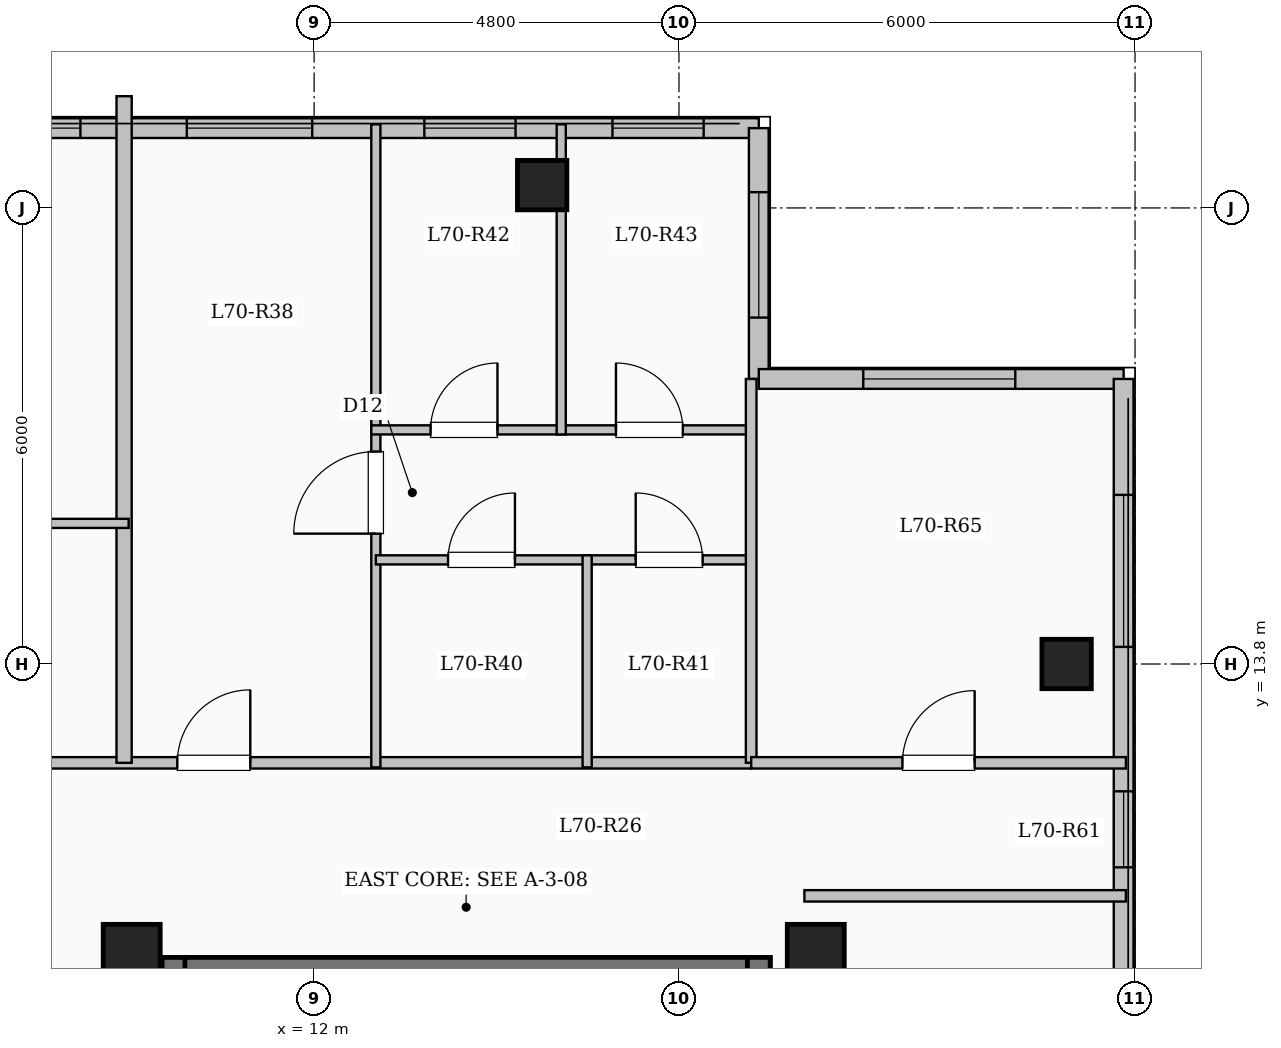
"""IFC4 building model, lengths in metres.
Left out: names, types, materials, properties, quantities, classifications, styles, units other than length and angle.
Written with IfcOpenShell. Run it as: python <this file> out.ifc"""

import sys

from ifc_helpers import new_model, si_unit, direction, frame, frame_2d, origin, origin_2d, place, context, subcontext, project, spatial, rectangle, extrude, element, fill, save


model = new_model("IFC4")
c1 = context("Model", 3, precision=1e-05, world=origin(), true_north=direction((0.0, 1.0)))
c2 = subcontext(c1, "Body", "Model", "MODEL_VIEW")
j1 = project(units=[si_unit("LENGTHUNIT", "METRE"), si_unit("PLANEANGLEUNIT", "RADIAN")], contexts=[c1])
p1 = place(None, origin())
s1 = spatial("IfcSite", under=j1, at=p1, CompositionType="ELEMENT")
p2 = place(p1, origin())
s2 = spatial("IfcBuilding", under=s1, at=p2, CompositionType="ELEMENT")
p3 = place(p2, frame((0.0, 0.0, 258.25)))
s3 = spatial("IfcBuildingStorey", under=s2, at=p3, CompositionType="ELEMENT", Elevation=258.25)
for number, where, z_axis, x_axis in (
    (1, (9.6, 10.0, 0.0), (0.0, 0.0, 1.0), (1.0, 0.0, 0.0)),
    (2, (18.6, 10.0, 0.0), (0.0, 0.0, 1.0), (1.0, 0.0, 0.0)),
):
    element("IfcColumn", number, at=place(p3, frame(where, z_axis=z_axis, x_axis=x_axis)), inside=s3, PredefinedType="COLUMN", context=c2, shape_type="SweptSolid", body=[
        extrude(rectangle(XDim=0.75, YDim=0.75, at=origin_2d()), origin(), (0.0, 0.0, 1.0), 3.35),
    ])
for number, where, z_axis, x_axis in (
    (3, (15.0, 20.1, 0.0), (0.0, 0.0, 1.0), (1.0, 0.0, 0.0)),
    (4, (21.9, 13.8, 0.0), (0.0, 0.0, 1.0), (1.0, 0.0, 0.0)),
):
    element("IfcColumn", number, at=place(p3, frame(where, z_axis=z_axis, x_axis=x_axis)), inside=s3, PredefinedType="COLUMN", context=c2, shape_type="SweptSolid", body=[
        extrude(rectangle(XDim=0.65, YDim=0.65, at=origin_2d()), origin(), (0.0, 0.0, 1.0), 3.35),
    ])
p4 = place(p3, frame((7.35, 20.85, 0.0), z_axis=(0.0, 0.0, 1.0), x_axis=(1.0, 0.0, 0.0)))
e5 = element("IfcWall", 5, at=p4, inside=s3, PredefinedType="SOLIDWALL", context=c2, shape_type="SweptSolid", body=[
    extrude(rectangle(XDim=10.5, YDim=0.26, at=frame_2d((5.25, 0.0))), origin(), (0.0, 0.0, 1.0), 3.1),
])
p5 = place(p4, frame((0.375, 0.0, 0.95)))
e6 = element("IfcOpeningElement", 6, at=p5, cuts=e5, PredefinedType="OPENING", context=c2, shape_type="SweptSolid", body=[
    extrude(rectangle(XDim=1.2, YDim=1.5, at=frame_2d((0.6, 0.75))), frame((0.0, 0.14, 0.0), z_axis=(0.0, -1.0, 0.0), x_axis=(1.0, 0.0, 0.0)), (0.0, 0.0, 1.0), 0.28),
])
p6 = place(p4, frame((2.975, 0.0, 0.9)))
e7 = element("IfcOpeningElement", 7, at=p6, cuts=e5, PredefinedType="OPENING", context=c2, shape_type="SweptSolid", body=[
    extrude(rectangle(XDim=1.65, YDim=1.6, at=frame_2d((0.825, 0.8))), frame((0.0, 0.14, 0.0), z_axis=(0.0, -1.0, 0.0), x_axis=(1.0, 0.0, 0.0)), (0.0, 0.0, 1.0), 0.28),
])
p7 = place(p4, frame((6.1, 0.0, 0.95)))
e8 = element("IfcOpeningElement", 8, at=p7, cuts=e5, PredefinedType="OPENING", context=c2, shape_type="SweptSolid", body=[
    extrude(rectangle(XDim=1.2, YDim=1.5, at=frame_2d((0.6, 0.75))), frame((0.0, 0.14, 0.0), z_axis=(0.0, -1.0, 0.0), x_axis=(1.0, 0.0, 0.0)), (0.0, 0.0, 1.0), 0.28),
])
p8 = place(p4, frame((8.575, 0.0, 0.95)))
e9 = element("IfcOpeningElement", 9, at=p8, cuts=e5, PredefinedType="OPENING", context=c2, shape_type="SweptSolid", body=[
    extrude(rectangle(XDim=1.2, YDim=1.5, at=frame_2d((0.6, 0.75))), frame((0.0, 0.14, 0.0), z_axis=(0.0, -1.0, 0.0), x_axis=(1.0, 0.0, 0.0)), (0.0, 0.0, 1.0), 0.28),
])
p9 = place(p3, frame((17.85, 20.85, 0.0), z_axis=(0.0, 0.0, 1.0), x_axis=(0.0, -1.0, 0.0)))
e10 = element("IfcWall", 10, at=p9, inside=s3, PredefinedType="SOLIDWALL", context=c2, shape_type="SweptSolid", body=[
    extrude(rectangle(XDim=3.3, YDim=0.26, at=frame_2d((1.65, 0.0))), origin(), (0.0, 0.0, 1.0), 3.1),
])
p10 = place(p9, frame((0.843, 0.0, 0.9)))
e11 = element("IfcOpeningElement", 11, at=p10, cuts=e10, PredefinedType="OPENING", context=c2, shape_type="SweptSolid", body=[
    extrude(rectangle(XDim=1.65, YDim=1.6, at=frame_2d((0.825, 0.8))), frame((0.0, 0.14, 0.0), z_axis=(0.0, -1.0, 0.0), x_axis=(1.0, 0.0, 0.0)), (0.0, 0.0, 1.0), 0.28),
])
p11 = place(p3, frame((17.85, 17.55, 0.0), z_axis=(0.0, 0.0, 1.0), x_axis=(1.0, 0.0, 0.0)))
e12 = element("IfcWall", 12, at=p11, inside=s3, PredefinedType="SOLIDWALL", context=c2, shape_type="SweptSolid", body=[
    extrude(rectangle(XDim=4.8, YDim=0.26, at=frame_2d((2.4, 0.0))), origin(), (0.0, 0.0, 1.0), 3.1),
])
p12 = place(p11, frame((1.375, 0.0, 0.9)))
e13 = element("IfcOpeningElement", 13, at=p12, cuts=e12, PredefinedType="OPENING", context=c2, shape_type="SweptSolid", body=[
    extrude(rectangle(XDim=2.0, YDim=1.7, at=frame_2d((1.0, 0.85))), frame((0.0, 0.14, 0.0), z_axis=(0.0, -1.0, 0.0), x_axis=(1.0, 0.0, 0.0)), (0.0, 0.0, 1.0), 0.28),
])
p13 = place(p3, frame((22.65, 17.55, 0.0), z_axis=(0.0, 0.0, 1.0), x_axis=(0.0, -1.0, 0.0)))
e14 = element("IfcWall", 14, at=p13, inside=s3, PredefinedType="SOLIDWALL", context=c2, shape_type="SweptSolid", body=[
    extrude(rectangle(XDim=35.1, YDim=0.26, at=frame_2d((17.55, 0.0))), origin(), (0.0, 0.0, 1.0), 3.1),
])
p14 = place(p13, frame((1.525, 0.0, 0.9)))
e15 = element("IfcOpeningElement", 15, at=p14, cuts=e14, PredefinedType="OPENING", context=c2, shape_type="SweptSolid", body=[
    extrude(rectangle(XDim=2.0, YDim=1.7, at=frame_2d((1.0, 0.85))), frame((0.0, 0.14, 0.0), z_axis=(0.0, -1.0, 0.0), x_axis=(1.0, 0.0, 0.0)), (0.0, 0.0, 1.0), 0.28),
])
p15 = place(p13, frame((5.425, 0.0, 0.95)))
e16 = element("IfcOpeningElement", 16, at=p15, cuts=e14, PredefinedType="OPENING", context=c2, shape_type="SweptSolid", body=[
    extrude(rectangle(XDim=1.0, YDim=1.5, at=frame_2d((0.5, 0.75))), frame((0.0, 0.14, 0.0), z_axis=(0.0, -1.0, 0.0), x_axis=(1.0, 0.0, 0.0)), (0.0, 0.0, 1.0), 0.28),
])
p16 = place(p13, frame((14.8, 0.0, 0.9)))
e17 = element("IfcOpeningElement", 17, at=p16, cuts=e14, PredefinedType="OPENING", context=c2, shape_type="SweptSolid", body=[
    extrude(rectangle(XDim=2.0, YDim=1.7, at=frame_2d((1.0, 0.85))), frame((0.0, 0.14, 0.0), z_axis=(0.0, -1.0, 0.0), x_axis=(1.0, 0.0, 0.0)), (0.0, 0.0, 1.0), 0.28),
])
p17 = place(p13, frame((25.275, 0.0, 0.95)))
e18 = element("IfcOpeningElement", 18, at=p17, cuts=e14, PredefinedType="OPENING", context=c2, shape_type="SweptSolid", body=[
    extrude(rectangle(XDim=1.2, YDim=1.5, at=frame_2d((0.6, 0.75))), frame((0.0, 0.14, 0.0), z_axis=(0.0, -1.0, 0.0), x_axis=(1.0, 0.0, 0.0)), (0.0, 0.0, 1.0), 0.28),
])
p18 = place(p13, frame((29.925, 0.0, 0.9)))
e19 = element("IfcOpeningElement", 19, at=p18, cuts=e14, PredefinedType="OPENING", context=c2, shape_type="SweptSolid", body=[
    extrude(rectangle(XDim=2.2, YDim=1.75, at=frame_2d((1.1, 0.875))), frame((0.0, 0.14, 0.0), z_axis=(0.0, -1.0, 0.0), x_axis=(1.0, 0.0, 0.0)), (0.0, 0.0, 1.0), 0.28),
])
p19 = place(p3, frame((10.0, 9.79, 0.0), z_axis=(0.0, 0.0, 1.0), x_axis=(1.0, 0.0, 0.0)))
e20 = element("IfcWall", 20, at=p19, inside=s3, PredefinedType="SHEAR", context=c2, shape_type="SweptSolid", body=[
    extrude(rectangle(XDim=8.0, YDim=0.3, at=frame_2d((4.0, 0.0))), origin(), (0.0, 0.0, 1.0), 3.35),
])
for number, where, z_axis, x_axis in (
    (21, (10.15, 6.35, 0.0), (0.0, 0.0, 1.0), (0.0, 1.0, 0.0)),
    (22, (17.85, 6.35, 0.0), (0.0, 0.0, 1.0), (0.0, 1.0, 0.0)),
):
    element("IfcWall", number, at=place(p3, frame(where, z_axis=z_axis, x_axis=x_axis)), inside=s3, PredefinedType="SHEAR", context=c2, shape_type="SweptSolid", body=[
        extrude(rectangle(XDim=3.59, YDim=0.3, at=frame_2d((1.795, 0.0))), origin(), (0.0, 0.0, 1.0), 3.35),
    ])
p20 = place(p3, frame((3.85, 12.5, 0.0), z_axis=(0.0, 0.0, 1.0), x_axis=(1.0, 0.0, 0.0)))
e23 = element("IfcWall", 23, at=p20, inside=s3, PredefinedType="PARTITIONING", context=c2, shape_type="SweptSolid", body=[
    extrude(rectangle(XDim=13.9, YDim=0.15, at=frame_2d((6.95, 0.0))), origin(), (0.0, 0.0, 1.0), 3.1),
])
p21 = place(p20, frame((1.45, 0.0, 0.0)))
e24 = element("IfcOpeningElement", 24, at=p21, cuts=e23, PredefinedType="OPENING", context=c2, shape_type="SweptSolid", body=[
    extrude(rectangle(XDim=0.96, YDim=2.15, at=frame_2d((0.48, 1.075))), frame((0.0, 0.085, 0.0), z_axis=(0.0, -1.0, 0.0), x_axis=(1.0, 0.0, 0.0)), (0.0, 0.0, 1.0), 0.17),
])
p22 = place(p20, frame((6.35, 0.0, 0.0)))
e25 = element("IfcOpeningElement", 25, at=p22, cuts=e23, PredefinedType="OPENING", context=c2, shape_type="SweptSolid", body=[
    extrude(rectangle(XDim=0.96, YDim=2.15, at=frame_2d((0.48, 1.075))), frame((0.0, 0.085, 0.0), z_axis=(0.0, -1.0, 0.0), x_axis=(1.0, 0.0, 0.0)), (0.0, 0.0, 1.0), 0.17),
])
p23 = place(p3, frame((9.5, 12.5, 0.0), z_axis=(0.0, 0.0, 1.0), x_axis=(0.0, 1.0, 0.0)))
e26 = element("IfcWall", 26, at=p23, inside=s3, PredefinedType="SOLIDWALL", context=c2, shape_type="SweptSolid", body=[
    extrude(rectangle(XDim=8.77, YDim=0.2, at=frame_2d((4.385, 0.0))), origin(), (0.0, 0.0, 1.0), 3.1),
])
p24 = place(p3, frame((4.965, 15.65, 0.0), z_axis=(0.0, 0.0, 1.0), x_axis=(1.0, 0.0, 0.0)))
e27 = element("IfcWall", 27, at=p24, inside=s3, PredefinedType="PARTITIONING", context=c2, shape_type="SweptSolid", body=[
    extrude(rectangle(XDim=4.595, YDim=0.12, at=frame_2d((2.297, 0.0))), origin(), (0.0, 0.0, 1.0), 2.785),
])
p25 = place(p3, frame((12.812, 12.44, 0.0), z_axis=(0.0, 0.0, 1.0), x_axis=(0.0, 1.0, 0.0)))
e28 = element("IfcWall", 28, at=p25, inside=s3, PredefinedType="PARTITIONING", context=c2, shape_type="SweptSolid", body=[
    extrude(rectangle(XDim=8.46, YDim=0.12, at=frame_2d((4.23, 0.0))), origin(), (0.0, 0.0, 1.0), 3.1),
])
p26 = place(p25, frame((3.075, 0.0, 0.0)))
e29 = element("IfcOpeningElement", 29, at=p26, cuts=e28, PredefinedType="OPENING", context=c2, shape_type="SweptSolid", body=[
    extrude(rectangle(XDim=1.08, YDim=2.15, at=frame_2d((0.54, 1.075))), frame((0.0, 0.07, 0.0), z_axis=(0.0, -1.0, 0.0), x_axis=(1.0, 0.0, 0.0)), (0.0, 0.0, 1.0), 0.14),
])
p27 = place(p3, frame((12.812, 15.17, 0.0), z_axis=(0.0, 0.0, 1.0), x_axis=(1.0, 0.0, 0.0)))
e30 = element("IfcWall", 30, at=p27, inside=s3, PredefinedType="PARTITIONING", context=c2, shape_type="SweptSolid", body=[
    extrude(rectangle(XDim=2.78, YDim=0.12, at=frame_2d((1.39, 0.0))), origin(), (0.0, 0.0, 1.0), 3.1),
])
p28 = place(p27, frame((0.95, 0.0, 0.0)))
e31 = element("IfcOpeningElement", 31, at=p28, cuts=e30, PredefinedType="OPENING", context=c2, shape_type="SweptSolid", body=[
    extrude(rectangle(XDim=0.88, YDim=2.1, at=frame_2d((0.44, 1.05))), frame((0.0, 0.07, 0.0), z_axis=(0.0, -1.0, 0.0), x_axis=(1.0, 0.0, 0.0)), (0.0, 0.0, 1.0), 0.14),
])
p29 = place(p3, frame((15.592, 15.17, 0.0), z_axis=(0.0, 0.0, 1.0), x_axis=(1.0, 0.0, 0.0)))
e32 = element("IfcWall", 32, at=p29, inside=s3, PredefinedType="PARTITIONING", context=c2, shape_type="SweptSolid", body=[
    extrude(rectangle(XDim=2.158, YDim=0.12, at=frame_2d((1.079, 0.0))), origin(), (0.0, 0.0, 1.0), 3.1),
])
p30 = place(p29, frame((0.639, 0.0, 0.0)))
e33 = element("IfcOpeningElement", 33, at=p30, cuts=e32, PredefinedType="OPENING", context=c2, shape_type="SweptSolid", body=[
    extrude(rectangle(XDim=0.88, YDim=2.1, at=frame_2d((0.44, 1.05))), frame((0.0, 0.07, 0.0), z_axis=(0.0, -1.0, 0.0), x_axis=(1.0, 0.0, 0.0)), (0.0, 0.0, 1.0), 0.14),
])
p31 = place(p3, frame((12.752, 16.88, 0.0), z_axis=(0.0, 0.0, 1.0), x_axis=(1.0, 0.0, 0.0)))
e34 = element("IfcWall", 34, at=p31, inside=s3, PredefinedType="PARTITIONING", context=c2, shape_type="SweptSolid", body=[
    extrude(rectangle(XDim=5.058, YDim=0.12, at=frame_2d((2.529, 0.0))), origin(), (0.0, 0.0, 1.0), 2.785),
])
p32 = place(p31, frame((0.78, 0.0, 0.0)))
e35 = element("IfcOpeningElement", 35, at=p32, cuts=e34, PredefinedType="OPENING", context=c2, shape_type="SweptSolid", body=[
    extrude(rectangle(XDim=0.88, YDim=2.1, at=frame_2d((0.44, 1.05))), frame((0.0, 0.07, 0.0), z_axis=(0.0, -1.0, 0.0), x_axis=(1.0, 0.0, 0.0)), (0.0, 0.0, 1.0), 0.14),
])
p33 = place(p31, frame((3.219, 0.0, 0.0)))
e36 = element("IfcOpeningElement", 36, at=p33, cuts=e34, PredefinedType="OPENING", context=c2, shape_type="SweptSolid", body=[
    extrude(rectangle(XDim=0.88, YDim=2.1, at=frame_2d((0.44, 1.05))), frame((0.0, 0.07, 0.0), z_axis=(0.0, -1.0, 0.0), x_axis=(1.0, 0.0, 0.0)), (0.0, 0.0, 1.0), 0.14),
])
p34 = place(p3, frame((15.592, 12.44, 0.0), z_axis=(0.0, 0.0, 1.0), x_axis=(0.0, 1.0, 0.0)))
e37 = element("IfcWall", 37, at=p34, inside=s3, PredefinedType="PARTITIONING", context=c2, shape_type="SweptSolid", body=[
    extrude(rectangle(XDim=2.79, YDim=0.12, at=frame_2d((1.395, 0.0))), origin(), (0.0, 0.0, 1.0), 3.1),
])
p35 = place(p3, frame((15.251, 16.82, 0.0), z_axis=(0.0, 0.0, 1.0), x_axis=(0.0, 1.0, 0.0)))
e38 = element("IfcWall", 38, at=p35, inside=s3, PredefinedType="PARTITIONING", context=c2, shape_type="SweptSolid", body=[
    extrude(rectangle(XDim=4.08, YDim=0.12, at=frame_2d((2.04, 0.0))), origin(), (0.0, 0.0, 1.0), 2.685),
])
p36 = place(p3, frame((18.45, 10.75, 0.0), z_axis=(0.0, 0.0, 1.0), x_axis=(1.0, 0.0, 0.0)))
e39 = element("IfcWall", 39, at=p36, inside=s3, PredefinedType="PARTITIONING", context=c2, shape_type="SweptSolid", body=[
    extrude(rectangle(XDim=4.23, YDim=0.15, at=frame_2d((2.115, 0.0))), origin(), (0.0, 0.0, 1.0), 3.1),
])
p37 = place(p3, frame((17.75, 12.5, 0.0), z_axis=(0.0, 0.0, 1.0), x_axis=(0.0, 1.0, 0.0)))
e40 = element("IfcWall", 40, at=p37, inside=s3, PredefinedType="PARTITIONING", context=c2, shape_type="SweptSolid", body=[
    extrude(rectangle(XDim=5.05, YDim=0.14, at=frame_2d((2.525, 0.0))), origin(), (0.0, 0.0, 1.0), 3.1),
])
p38 = place(p3, frame((17.75, 12.5, 0.0), z_axis=(0.0, 0.0, 1.0), x_axis=(1.0, 0.0, 0.0)))
e41 = element("IfcWall", 41, at=p38, inside=s3, PredefinedType="PARTITIONING", context=c2, shape_type="SweptSolid", body=[
    extrude(rectangle(XDim=4.93, YDim=0.15, at=frame_2d((2.465, 0.0))), origin(), (0.0, 0.0, 1.0), 3.1),
])
p39 = place(p38, frame((1.99, 0.0, 0.0)))
e42 = element("IfcOpeningElement", 42, at=p39, cuts=e41, PredefinedType="OPENING", context=c2, shape_type="SweptSolid", body=[
    extrude(rectangle(XDim=0.95, YDim=2.15, at=frame_2d((0.475, 1.075))), frame((0.0, 0.085, 0.0), z_axis=(0.0, -1.0, 0.0), x_axis=(1.0, 0.0, 0.0)), (0.0, 0.0, 1.0), 0.17),
])
p40 = place(p5, origin())
e43 = element("IfcWindow", 43, at=p40, inside=s3, PartitioningType="SINGLE_PANEL", PredefinedType="WINDOW", context=c2, shape_type="SweptSolid", body=[
    extrude(rectangle(XDim=1.2, YDim=1.5, at=frame_2d((0.6, 0.75))), frame((0.0, 0.03, 0.0), z_axis=(0.0, -1.0, 0.0), x_axis=(1.0, 0.0, 0.0)), (0.0, 0.0, 1.0), 0.06),
])
fill(e6, e43)
p41 = place(p6, origin())
e44 = element("IfcWindow", 44, at=p41, inside=s3, PartitioningType="SINGLE_PANEL", PredefinedType="WINDOW", context=c2, shape_type="SweptSolid", body=[
    extrude(rectangle(XDim=1.65, YDim=1.6, at=frame_2d((0.825, 0.8))), frame((0.0, 0.03, 0.0), z_axis=(0.0, -1.0, 0.0), x_axis=(1.0, 0.0, 0.0)), (0.0, 0.0, 1.0), 0.06),
])
fill(e7, e44)
p42 = place(p7, origin())
e45 = element("IfcWindow", 45, at=p42, inside=s3, PartitioningType="SINGLE_PANEL", PredefinedType="WINDOW", context=c2, shape_type="SweptSolid", body=[
    extrude(rectangle(XDim=1.2, YDim=1.5, at=frame_2d((0.6, 0.75))), frame((0.0, 0.03, 0.0), z_axis=(0.0, -1.0, 0.0), x_axis=(1.0, 0.0, 0.0)), (0.0, 0.0, 1.0), 0.06),
])
fill(e8, e45)
p43 = place(p8, origin())
e46 = element("IfcWindow", 46, at=p43, inside=s3, PartitioningType="SINGLE_PANEL", PredefinedType="WINDOW", context=c2, shape_type="SweptSolid", body=[
    extrude(rectangle(XDim=1.2, YDim=1.5, at=frame_2d((0.6, 0.75))), frame((0.0, 0.03, 0.0), z_axis=(0.0, -1.0, 0.0), x_axis=(1.0, 0.0, 0.0)), (0.0, 0.0, 1.0), 0.06),
])
fill(e9, e46)
p44 = place(p10, origin())
e47 = element("IfcWindow", 47, at=p44, inside=s3, PartitioningType="SINGLE_PANEL", PredefinedType="WINDOW", context=c2, shape_type="SweptSolid", body=[
    extrude(rectangle(XDim=1.65, YDim=1.6, at=frame_2d((0.825, 0.8))), frame((0.0, 0.03, 0.0), z_axis=(0.0, -1.0, 0.0), x_axis=(1.0, 0.0, 0.0)), (0.0, 0.0, 1.0), 0.06),
])
fill(e11, e47)
p45 = place(p12, origin())
e48 = element("IfcWindow", 48, at=p45, inside=s3, PartitioningType="SINGLE_PANEL", PredefinedType="WINDOW", context=c2, shape_type="SweptSolid", body=[
    extrude(rectangle(XDim=2.0, YDim=1.7, at=frame_2d((1.0, 0.85))), frame((0.0, 0.03, 0.0), z_axis=(0.0, -1.0, 0.0), x_axis=(1.0, 0.0, 0.0)), (0.0, 0.0, 1.0), 0.06),
])
fill(e13, e48)
p46 = place(p14, origin())
e49 = element("IfcWindow", 49, at=p46, inside=s3, PartitioningType="SINGLE_PANEL", PredefinedType="WINDOW", context=c2, shape_type="SweptSolid", body=[
    extrude(rectangle(XDim=2.0, YDim=1.7, at=frame_2d((1.0, 0.85))), frame((0.0, 0.03, 0.0), z_axis=(0.0, -1.0, 0.0), x_axis=(1.0, 0.0, 0.0)), (0.0, 0.0, 1.0), 0.06),
])
fill(e15, e49)
p47 = place(p15, origin())
e50 = element("IfcWindow", 50, at=p47, inside=s3, PartitioningType="SINGLE_PANEL", PredefinedType="WINDOW", context=c2, shape_type="SweptSolid", body=[
    extrude(rectangle(XDim=1.0, YDim=1.5, at=frame_2d((0.5, 0.75))), frame((0.0, 0.03, 0.0), z_axis=(0.0, -1.0, 0.0), x_axis=(1.0, 0.0, 0.0)), (0.0, 0.0, 1.0), 0.06),
])
fill(e16, e50)
p48 = place(p22, origin())
e51 = element("IfcDoor", 51, at=p48, inside=s3, OperationType="SINGLE_SWING_RIGHT", PredefinedType="DOOR", context=c2, shape_type="SweptSolid", body=[
    extrude(rectangle(XDim=0.96, YDim=2.15, at=frame_2d((0.48, 1.075))), frame((0.0, 0.025, 0.0), z_axis=(0.0, -1.0, 0.0), x_axis=(1.0, 0.0, 0.0)), (0.0, 0.0, 1.0), 0.05),
])
fill(e25, e51)
p49 = place(p26, origin())
e52 = element("IfcDoor", 52, at=p49, inside=s3, OperationType="SINGLE_SWING_LEFT", PredefinedType="DOOR", context=c2, shape_type="SweptSolid", body=[
    extrude(rectangle(XDim=1.08, YDim=2.15, at=frame_2d((0.54, 1.075))), frame((0.0, 0.025, 0.0), z_axis=(0.0, -1.0, 0.0), x_axis=(1.0, 0.0, 0.0)), (0.0, 0.0, 1.0), 0.05),
])
fill(e29, e52)
p50 = place(p28, origin())
e53 = element("IfcDoor", 53, at=p50, inside=s3, OperationType="SINGLE_SWING_RIGHT", PredefinedType="DOOR", context=c2, shape_type="SweptSolid", body=[
    extrude(rectangle(XDim=0.88, YDim=2.1, at=frame_2d((0.44, 1.05))), frame((0.0, 0.025, 0.0), z_axis=(0.0, -1.0, 0.0), x_axis=(1.0, 0.0, 0.0)), (0.0, 0.0, 1.0), 0.05),
])
fill(e31, e53)
p51 = place(p30, origin())
e54 = element("IfcDoor", 54, at=p51, inside=s3, OperationType="SINGLE_SWING_LEFT", PredefinedType="DOOR", context=c2, shape_type="SweptSolid", body=[
    extrude(rectangle(XDim=0.88, YDim=2.1, at=frame_2d((0.44, 1.05))), frame((0.0, 0.025, 0.0), z_axis=(0.0, -1.0, 0.0), x_axis=(1.0, 0.0, 0.0)), (0.0, 0.0, 1.0), 0.05),
])
fill(e33, e54)
p52 = place(p32, origin())
e55 = element("IfcDoor", 55, at=p52, inside=s3, OperationType="SINGLE_SWING_RIGHT", PredefinedType="DOOR", context=c2, shape_type="SweptSolid", body=[
    extrude(rectangle(XDim=0.88, YDim=2.1, at=frame_2d((0.44, 1.05))), frame((0.0, 0.025, 0.0), z_axis=(0.0, -1.0, 0.0), x_axis=(1.0, 0.0, 0.0)), (0.0, 0.0, 1.0), 0.05),
])
fill(e35, e55)
p53 = place(p33, origin())
e56 = element("IfcDoor", 56, at=p53, inside=s3, OperationType="SINGLE_SWING_LEFT", PredefinedType="DOOR", context=c2, shape_type="SweptSolid", body=[
    extrude(rectangle(XDim=0.88, YDim=2.1, at=frame_2d((0.44, 1.05))), frame((0.0, 0.025, 0.0), z_axis=(0.0, -1.0, 0.0), x_axis=(1.0, 0.0, 0.0)), (0.0, 0.0, 1.0), 0.05),
])
fill(e36, e56)
p54 = place(p39, origin())
e57 = element("IfcDoor", 57, at=p54, inside=s3, OperationType="SINGLE_SWING_RIGHT", PredefinedType="DOOR", context=c2, shape_type="SweptSolid", body=[
    extrude(rectangle(XDim=0.95, YDim=2.15, at=frame_2d((0.475, 1.075))), frame((0.0, 0.025, 0.0), z_axis=(0.0, -1.0, 0.0), x_axis=(1.0, 0.0, 0.0)), (0.0, 0.0, 1.0), 0.05),
])
fill(e42, e57)
save(model, sys.argv[1])
